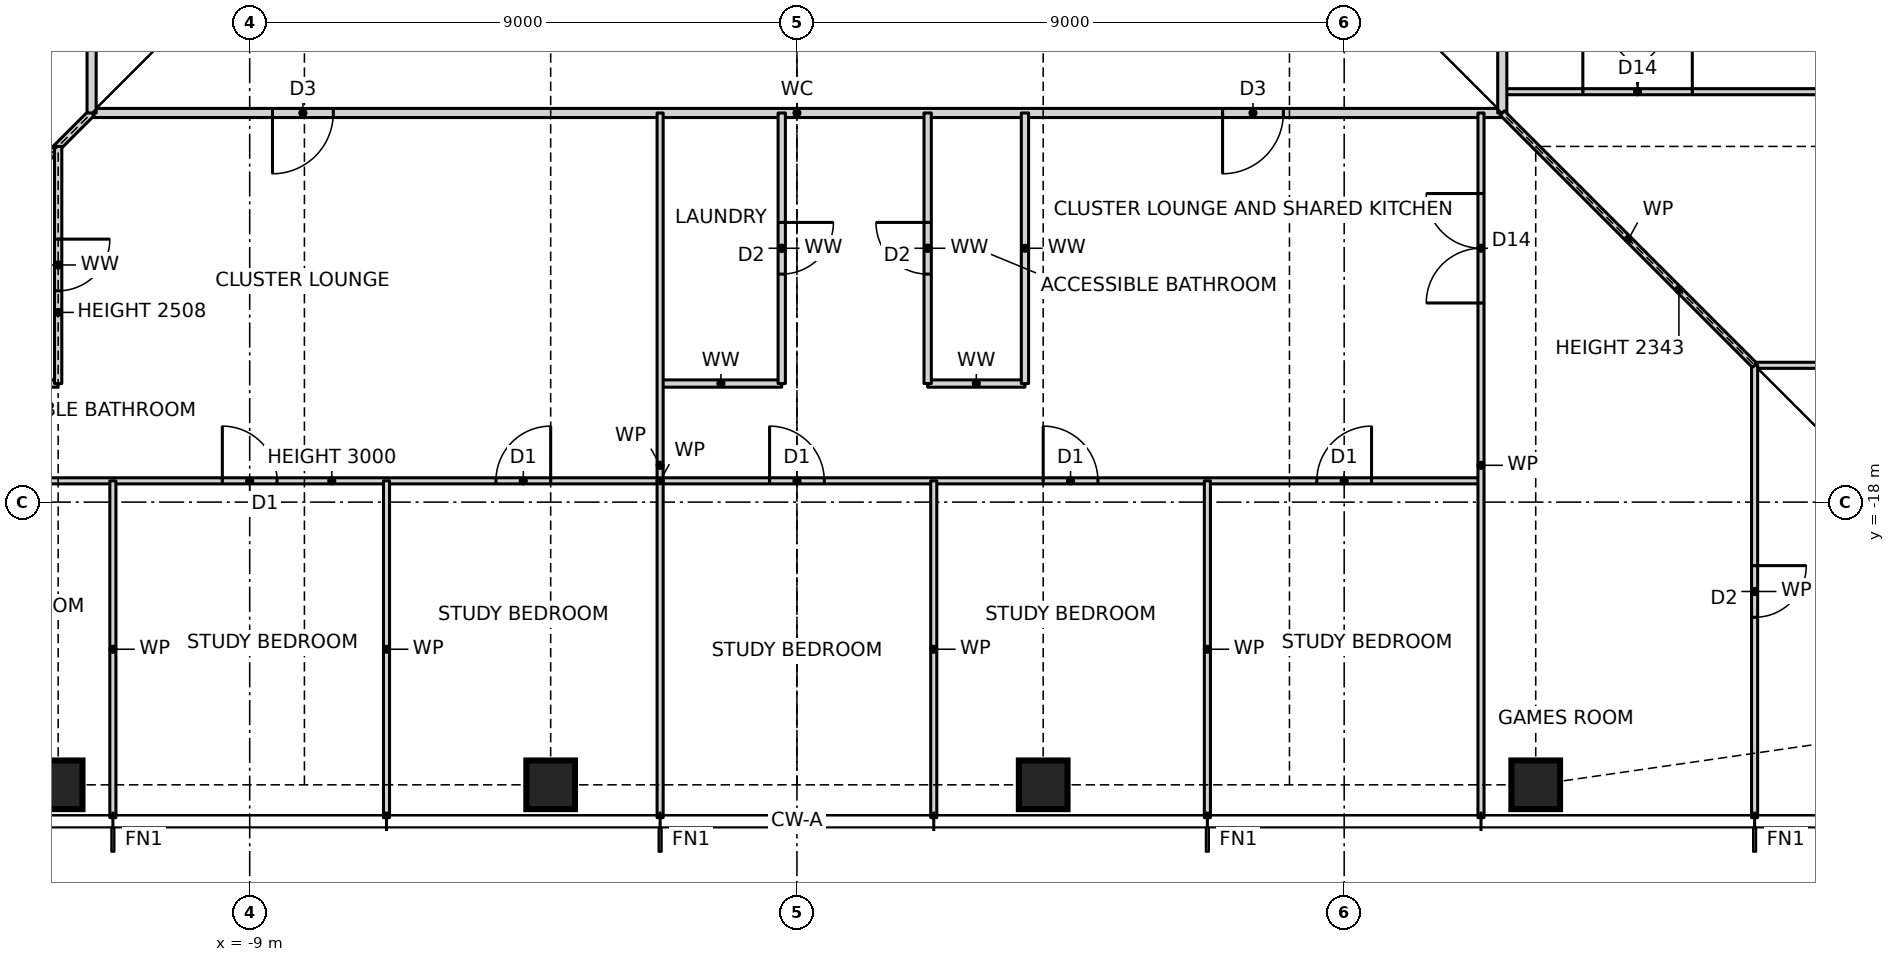
"""IFC4 building model, lengths in metres.
Left out: names, types, materials, properties, quantities, classifications, styles, units other than length and angle.
Written with IfcOpenShell. Run it as: python <this file> out.ifc"""

import sys

from ifc_helpers import new_model, si_unit, direction, frame, frame_2d, origin, origin_2d, place, context, subcontext, project, spatial, rectangle, hollow_rectangle, extrude, element, fill, save


model = new_model("IFC4")
c1 = context("Model", 3, precision=1e-05, world=origin(), true_north=direction((0.0, 1.0)))
c2 = subcontext(c1, "Body", "Model", "MODEL_VIEW")
j1 = project(units=[si_unit("LENGTHUNIT", "METRE"), si_unit("PLANEANGLEUNIT", "RADIAN")], contexts=[c1])
p1 = place(None, origin())
s1 = spatial("IfcSite", under=j1, at=p1, CompositionType="ELEMENT")
p2 = place(p1, origin())
s2 = spatial("IfcBuilding", under=s1, at=p2, CompositionType="ELEMENT")
p3 = place(p2, frame((0.0, 0.0, 39.5)))
s3 = spatial("IfcBuildingStorey", under=s2, at=p3, CompositionType="ELEMENT", Elevation=39.5)
for number, where, z_axis, x_axis in (
    (1, (-12.15, -22.65, 0.0), (0.0, 0.0, 1.0), (1.0, 0.0, 0.0)),
    (2, (-4.05, -22.65, 0.0), (0.0, 0.0, 1.0), (1.0, 0.0, 0.0)),
    (3, (4.05, -22.65, 0.0), (0.0, 0.0, 1.0), (1.0, 0.0, 0.0)),
    (4, (12.15, -22.65, 0.0), (0.0, 0.0, 1.0), (1.0, 0.0, 0.0)),
):
    element("IfcColumn", number, at=place(p3, frame(where, z_axis=z_axis, x_axis=x_axis)), inside=s3, PredefinedType="COLUMN", context=c2, shape_type="SweptSolid", body=[
        extrude(hollow_rectangle(XDim=0.8, YDim=0.8, WallThickness=0.09, at=origin_2d()), origin(), (0.0, 0.0, 1.0), 3.5),
    ])
p4 = place(p3, frame((-15.75, -17.65, 0.0), z_axis=(0.0, 0.0, 1.0), x_axis=(1.0, 0.0, 0.0)))
e5 = element("IfcWall", 5, at=p4, inside=s3, PredefinedType="PARTITIONING", context=c2, shape_type="SweptSolid", body=[
    extrude(rectangle(XDim=27.0, YDim=0.1, at=frame_2d((13.5, 0.0))), origin(), (0.0, 0.0, 1.0), 3.0),
])
p5 = place(p4, frame((1.8, 0.0, 0.0)))
e6 = element("IfcOpeningElement", 6, at=p5, cuts=e5, PredefinedType="OPENING", context=c2, shape_type="SweptSolid", body=[
    extrude(rectangle(XDim=0.9, YDim=2.1, at=frame_2d((0.45, 1.05))), frame((0.0, 0.06, 0.0), z_axis=(0.0, -1.0, 0.0), x_axis=(1.0, 0.0, 0.0)), (0.0, 0.0, 1.0), 0.12),
])
p6 = place(p4, frame((6.3, 0.0, 0.0)))
e7 = element("IfcOpeningElement", 7, at=p6, cuts=e5, PredefinedType="OPENING", context=c2, shape_type="SweptSolid", body=[
    extrude(rectangle(XDim=0.9, YDim=2.1, at=frame_2d((0.45, 1.05))), frame((0.0, 0.06, 0.0), z_axis=(0.0, -1.0, 0.0), x_axis=(1.0, 0.0, 0.0)), (0.0, 0.0, 1.0), 0.12),
])
p7 = place(p4, frame((10.8, 0.0, 0.0)))
e8 = element("IfcOpeningElement", 8, at=p7, cuts=e5, PredefinedType="OPENING", context=c2, shape_type="SweptSolid", body=[
    extrude(rectangle(XDim=0.9, YDim=2.1, at=frame_2d((0.45, 1.05))), frame((0.0, 0.06, 0.0), z_axis=(0.0, -1.0, 0.0), x_axis=(1.0, 0.0, 0.0)), (0.0, 0.0, 1.0), 0.12),
])
p8 = place(p4, frame((15.3, 0.0, 0.0)))
e9 = element("IfcOpeningElement", 9, at=p8, cuts=e5, PredefinedType="OPENING", context=c2, shape_type="SweptSolid", body=[
    extrude(rectangle(XDim=0.9, YDim=2.1, at=frame_2d((0.45, 1.05))), frame((0.0, 0.06, 0.0), z_axis=(0.0, -1.0, 0.0), x_axis=(1.0, 0.0, 0.0)), (0.0, 0.0, 1.0), 0.12),
])
p9 = place(p4, frame((19.8, 0.0, 0.0)))
e10 = element("IfcOpeningElement", 10, at=p9, cuts=e5, PredefinedType="OPENING", context=c2, shape_type="SweptSolid", body=[
    extrude(rectangle(XDim=0.9, YDim=2.1, at=frame_2d((0.45, 1.05))), frame((0.0, 0.06, 0.0), z_axis=(0.0, -1.0, 0.0), x_axis=(1.0, 0.0, 0.0)), (0.0, 0.0, 1.0), 0.12),
])
p10 = place(p4, frame((24.3, 0.0, 0.0)))
e11 = element("IfcOpeningElement", 11, at=p10, cuts=e5, PredefinedType="OPENING", context=c2, shape_type="SweptSolid", body=[
    extrude(rectangle(XDim=0.9, YDim=2.1, at=frame_2d((0.45, 1.05))), frame((0.0, 0.06, 0.0), z_axis=(0.0, -1.0, 0.0), x_axis=(1.0, 0.0, 0.0)), (0.0, 0.0, 1.0), 0.12),
])
p11 = place(p3, frame((-15.75, -16.05, 0.0), z_axis=(0.0, 0.0, 1.0), x_axis=(1.0, 0.0, 0.0)))
e12 = element("IfcWall", 12, at=p11, inside=s3, PredefinedType="PARTITIONING", context=c2, shape_type="SweptSolid", body=[
    extrude(rectangle(XDim=3.6, YDim=0.12, at=frame_2d((1.8, 0.0))), origin(), (0.0, 0.0, 1.0), 3.27),
])
p12 = place(p3, frame((-2.25, -16.05, 0.0), z_axis=(0.0, 0.0, 1.0), x_axis=(1.0, 0.0, 0.0)))
e13 = element("IfcWall", 13, at=p12, inside=s3, PredefinedType="PARTITIONING", context=c2, shape_type="SweptSolid", body=[
    extrude(rectangle(XDim=2.0, YDim=0.12, at=frame_2d((1.0, 0.0))), origin(), (0.0, 0.0, 1.0), 3.27),
])
p13 = place(p3, frame((2.15, -16.05, 0.0), z_axis=(0.0, 0.0, 1.0), x_axis=(1.0, 0.0, 0.0)))
e14 = element("IfcWall", 14, at=p13, inside=s3, PredefinedType="PARTITIONING", context=c2, shape_type="SweptSolid", body=[
    extrude(rectangle(XDim=1.6, YDim=0.12, at=frame_2d((0.8, 0.0))), origin(), (0.0, 0.0, 1.0), 3.27),
])
p14 = place(p3, frame((15.75, -15.75, 0.0), z_axis=(0.0, 0.0, 1.0), x_axis=(1.0, 0.0, 0.0)))
e15 = element("IfcWall", 15, at=p14, inside=s3, PredefinedType="PARTITIONING", context=c2, shape_type="SweptSolid", body=[
    extrude(rectangle(XDim=7.44, YDim=0.1, at=frame_2d((3.72, 0.0))), origin(), (0.0, 0.0, 1.0), 3.27),
])
p15 = place(p3, frame((-11.6, -11.6, 0.0), z_axis=(0.0, 0.0, 1.0), x_axis=(1.0, 0.0, 0.0)))
e16 = element("IfcWall", 16, at=p15, inside=s3, PredefinedType="PARTITIONING", context=c2, shape_type="SweptSolid", body=[
    extrude(rectangle(XDim=23.2, YDim=0.15, at=frame_2d((11.6, 0.0))), origin(), (0.0, 0.0, 1.0), 3.27),
])
p16 = place(p15, frame((2.975, 0.0, 0.0)))
e17 = element("IfcOpeningElement", 17, at=p16, cuts=e16, PredefinedType="OPENING", context=c2, shape_type="SweptSolid", body=[
    extrude(rectangle(XDim=1.0, YDim=2.1, at=frame_2d((0.5, 1.05))), frame((0.0, 0.085, 0.0), z_axis=(0.0, -1.0, 0.0), x_axis=(1.0, 0.0, 0.0)), (0.0, 0.0, 1.0), 0.17),
])
p17 = place(p15, frame((18.6, 0.0, 0.0)))
e18 = element("IfcOpeningElement", 18, at=p17, cuts=e16, PredefinedType="OPENING", context=c2, shape_type="SweptSolid", body=[
    extrude(rectangle(XDim=1.0, YDim=2.1, at=frame_2d((0.5, 1.05))), frame((0.0, 0.085, 0.0), z_axis=(0.0, -1.0, 0.0), x_axis=(1.0, 0.0, 0.0)), (0.0, 0.0, 1.0), 0.17),
])
p18 = place(p3, frame((11.6, -11.25, 0.0), z_axis=(0.0, 0.0, 1.0), x_axis=(1.0, 0.0, 0.0)))
e19 = element("IfcWall", 19, at=p18, inside=s3, PredefinedType="PARTITIONING", context=c2, shape_type="SweptSolid", body=[
    extrude(rectangle(XDim=11.59, YDim=0.1, at=frame_2d((5.795, 0.0))), origin(), (0.0, 0.0, 1.0), 3.27),
])
p19 = place(p18, frame((1.325, 0.0, 0.0)))
e20 = element("IfcOpeningElement", 20, at=p19, cuts=e19, PredefinedType="OPENING", context=c2, shape_type="SweptSolid", body=[
    extrude(rectangle(XDim=1.8, YDim=2.1, at=frame_2d((0.9, 1.05))), frame((0.0, 0.06, 0.0), z_axis=(0.0, -1.0, 0.0), x_axis=(1.0, 0.0, 0.0)), (0.0, 0.0, 1.0), 0.12),
])
p20 = place(p3, frame((-15.75, -15.75, 0.0), z_axis=(0.0, 0.0, 1.0), x_axis=(0.707106781187, 0.707106781187, 0.0)))
e21 = element("IfcWall", 21, at=p20, inside=s3, PredefinedType="PARTITIONING", context=c2, shape_type="SweptSolid", body=[
    extrude(rectangle(XDim=5.869, YDim=0.12, at=frame_2d((2.935, 0.0))), origin(), (0.0, 0.0, 1.0), 2.343),
])
p21 = place(p3, frame((15.75, -23.19, 0.0), z_axis=(0.0, 0.0, 1.0), x_axis=(0.0, 1.0, 0.0)))
e22 = element("IfcWall", 22, at=p21, inside=s3, PredefinedType="PARTITIONING", context=c2, shape_type="SweptSolid", body=[
    extrude(rectangle(XDim=7.44, YDim=0.1, at=frame_2d((3.72, 0.0))), origin(), (0.0, 0.0, 1.0), 3.27),
])
p22 = place(p21, frame((3.295, 0.0, 0.0)))
e23 = element("IfcOpeningElement", 23, at=p22, cuts=e22, PredefinedType="OPENING", context=c2, shape_type="SweptSolid", body=[
    extrude(rectangle(XDim=0.85, YDim=2.1, at=frame_2d((0.425, 1.05))), frame((0.0, 0.06, 0.0), z_axis=(0.0, -1.0, 0.0), x_axis=(1.0, 0.0, 0.0)), (0.0, 0.0, 1.0), 0.12),
])
p23 = place(p3, frame((11.6, -11.6, 0.0), z_axis=(0.0, 0.0, 1.0), x_axis=(0.0, 1.0, 0.0)))
e24 = element("IfcWall", 24, at=p23, inside=s3, PredefinedType="PARTITIONING", context=c2, shape_type="SweptSolid", body=[
    extrude(rectangle(XDim=24.2, YDim=0.15, at=frame_2d((12.1, 0.0))), origin(), (0.0, 0.0, 1.0), 3.27),
])
p24 = place(p23, frame((3.6, 0.0, 0.0)))
e25 = element("IfcOpeningElement", 25, at=p24, cuts=e24, PredefinedType="OPENING", context=c2, shape_type="SweptSolid", body=[
    extrude(rectangle(XDim=1.0, YDim=2.1, at=frame_2d((0.5, 1.05))), frame((0.0, 0.085, 0.0), z_axis=(0.0, -1.0, 0.0), x_axis=(1.0, 0.0, 0.0)), (0.0, 0.0, 1.0), 0.17),
])
p25 = place(p23, frame((21.025, 0.0, 0.0)))
e26 = element("IfcOpeningElement", 26, at=p25, cuts=e24, PredefinedType="OPENING", context=c2, shape_type="SweptSolid", body=[
    extrude(rectangle(XDim=1.0, YDim=2.1, at=frame_2d((0.5, 1.05))), frame((0.0, 0.085, 0.0), z_axis=(0.0, -1.0, 0.0), x_axis=(1.0, 0.0, 0.0)), (0.0, 0.0, 1.0), 0.17),
])
p26 = place(p3, frame((11.25, -23.19, 0.0), z_axis=(0.0, 0.0, 1.0), x_axis=(0.0, 1.0, 0.0)))
e27 = element("IfcWall", 27, at=p26, inside=s3, PredefinedType="PARTITIONING", context=c2, shape_type="SweptSolid", body=[
    extrude(rectangle(XDim=11.59, YDim=0.1, at=frame_2d((5.795, 0.0))), origin(), (0.0, 0.0, 1.0), 3.27),
])
p27 = place(p26, frame((8.465, 0.0, 0.0)))
e28 = element("IfcOpeningElement", 28, at=p27, cuts=e27, PredefinedType="OPENING", context=c2, shape_type="SweptSolid", body=[
    extrude(rectangle(XDim=1.8, YDim=2.1, at=frame_2d((0.9, 1.05))), frame((0.0, 0.06, 0.0), z_axis=(0.0, -1.0, 0.0), x_axis=(1.0, 0.0, 0.0)), (0.0, 0.0, 1.0), 0.12),
])
p28 = place(p3, frame((6.75, -23.19, 0.0), z_axis=(0.0, 0.0, 1.0), x_axis=(0.0, 1.0, 0.0)))
e29 = element("IfcWall", 29, at=p28, inside=s3, PredefinedType="PARTITIONING", context=c2, shape_type="SweptSolid", body=[
    extrude(rectangle(XDim=5.54, YDim=0.1, at=frame_2d((2.77, 0.0))), origin(), (0.0, 0.0, 1.0), 3.27),
])
p29 = place(p3, frame((3.75, -16.05, 0.0), z_axis=(0.0, 0.0, 1.0), x_axis=(0.0, 1.0, 0.0)))
e30 = element("IfcWall", 30, at=p29, inside=s3, PredefinedType="PARTITIONING", context=c2, shape_type="SweptSolid", body=[
    extrude(rectangle(XDim=4.45, YDim=0.12, at=frame_2d((2.225, 0.0))), origin(), (0.0, 0.0, 1.0), 3.27),
])
p30 = place(p3, frame((2.25, -23.19, 0.0), z_axis=(0.0, 0.0, 1.0), x_axis=(0.0, 1.0, 0.0)))
e31 = element("IfcWall", 31, at=p30, inside=s3, PredefinedType="PARTITIONING", context=c2, shape_type="SweptSolid", body=[
    extrude(rectangle(XDim=5.54, YDim=0.1, at=frame_2d((2.77, 0.0))), origin(), (0.0, 0.0, 1.0), 3.27),
])
p31 = place(p3, frame((2.15, -16.05, 0.0), z_axis=(0.0, 0.0, 1.0), x_axis=(0.0, 1.0, 0.0)))
e32 = element("IfcWall", 32, at=p31, inside=s3, PredefinedType="PARTITIONING", context=c2, shape_type="SweptSolid", body=[
    extrude(rectangle(XDim=4.45, YDim=0.12, at=frame_2d((2.225, 0.0))), origin(), (0.0, 0.0, 1.0), 3.27),
])
p32 = place(p31, frame((1.8, 0.0, 0.0)))
e33 = element("IfcOpeningElement", 33, at=p32, cuts=e32, PredefinedType="OPENING", context=c2, shape_type="SweptSolid", body=[
    extrude(rectangle(XDim=0.85, YDim=2.1, at=frame_2d((0.425, 1.05))), frame((0.0, 0.07, 0.0), z_axis=(0.0, -1.0, 0.0), x_axis=(1.0, 0.0, 0.0)), (0.0, 0.0, 1.0), 0.14),
])
p33 = place(p3, frame((-0.25, -16.05, 0.0), z_axis=(0.0, 0.0, 1.0), x_axis=(0.0, 1.0, 0.0)))
e34 = element("IfcWall", 34, at=p33, inside=s3, PredefinedType="PARTITIONING", context=c2, shape_type="SweptSolid", body=[
    extrude(rectangle(XDim=4.45, YDim=0.12, at=frame_2d((2.225, 0.0))), origin(), (0.0, 0.0, 1.0), 3.27),
])
p34 = place(p33, frame((1.8, 0.0, 0.0)))
e35 = element("IfcOpeningElement", 35, at=p34, cuts=e34, PredefinedType="OPENING", context=c2, shape_type="SweptSolid", body=[
    extrude(rectangle(XDim=0.85, YDim=2.1, at=frame_2d((0.425, 1.05))), frame((0.0, 0.07, 0.0), z_axis=(0.0, -1.0, 0.0), x_axis=(1.0, 0.0, 0.0)), (0.0, 0.0, 1.0), 0.14),
])
p35 = place(p3, frame((-2.25, -23.19, 0.0), z_axis=(0.0, 0.0, 1.0), x_axis=(0.0, 1.0, 0.0)))
e36 = element("IfcWall", 36, at=p35, inside=s3, PredefinedType="PARTITIONING", context=c2, shape_type="SweptSolid", body=[
    extrude(rectangle(XDim=11.59, YDim=0.1, at=frame_2d((5.795, 0.0))), origin(), (0.0, 0.0, 1.0), 3.27),
])
for number, where, z_axis, x_axis in (
    (37, (-6.75, -23.19, 0.0), (0.0, 0.0, 1.0), (0.0, 1.0, 0.0)),
    (38, (-11.25, -23.19, 0.0), (0.0, 0.0, 1.0), (0.0, 1.0, 0.0)),
):
    element("IfcWall", number, at=place(p3, frame(where, z_axis=z_axis, x_axis=x_axis)), inside=s3, PredefinedType="PARTITIONING", context=c2, shape_type="SweptSolid", body=[
        extrude(rectangle(XDim=5.54, YDim=0.1, at=frame_2d((2.77, 0.0))), origin(), (0.0, 0.0, 1.0), 3.27),
    ])
p36 = place(p3, frame((-11.6, -11.6, 0.0), z_axis=(0.0, 0.0, 1.0), x_axis=(0.0, 1.0, 0.0)))
e39 = element("IfcWall", 39, at=p36, inside=s3, PredefinedType="PARTITIONING", context=c2, shape_type="SweptSolid", body=[
    extrude(rectangle(XDim=24.2, YDim=0.15, at=frame_2d((12.1, 0.0))), origin(), (0.0, 0.0, 1.0), 3.27),
])
p37 = place(p36, frame((12.14, 0.0, 0.0)))
e40 = element("IfcOpeningElement", 40, at=p37, cuts=e39, PredefinedType="OPENING", context=c2, shape_type="SweptSolid", body=[
    extrude(rectangle(XDim=1.0, YDim=2.1, at=frame_2d((0.5, 1.05))), frame((0.0, 0.085, 0.0), z_axis=(0.0, -1.0, 0.0), x_axis=(1.0, 0.0, 0.0)), (0.0, 0.0, 1.0), 0.17),
])
p38 = place(p3, frame((-12.15, -16.05, 0.0), z_axis=(0.0, 0.0, 1.0), x_axis=(0.0, 1.0, 0.0)))
e41 = element("IfcWall", 41, at=p38, inside=s3, PredefinedType="PARTITIONING", context=c2, shape_type="SweptSolid", body=[
    extrude(rectangle(XDim=3.9, YDim=0.12, at=frame_2d((1.95, 0.0))), origin(), (0.0, 0.0, 1.0), 2.508),
])
p39 = place(p38, frame((1.525, 0.0, 0.0)))
e42 = element("IfcOpeningElement", 42, at=p39, cuts=e41, PredefinedType="OPENING", context=c2, shape_type="SweptSolid", body=[
    extrude(rectangle(XDim=0.85, YDim=2.1, at=frame_2d((0.425, 1.05))), frame((0.0, 0.07, 0.0), z_axis=(0.0, -1.0, 0.0), x_axis=(1.0, 0.0, 0.0)), (0.0, 0.0, 1.0), 0.14),
])
p40 = place(p3, frame((15.75, -15.75, 0.0), z_axis=(0.0, 0.0, 1.0), x_axis=(-0.707106781187, 0.707106781187, 0.0)))
e43 = element("IfcWall", 43, at=p40, inside=s3, PredefinedType="PARTITIONING", context=c2, shape_type="SweptSolid", body=[
    extrude(rectangle(XDim=5.869, YDim=0.1, at=frame_2d((2.935, 0.0))), origin(), (0.0, 0.0, 1.0), 2.343),
])
p41 = place(p6, origin())
e44 = element("IfcDoor", 44, at=p41, inside=s3, OperationType="SINGLE_SWING_LEFT", PredefinedType="DOOR", context=c2, shape_type="SweptSolid", body=[
    extrude(rectangle(XDim=0.9, YDim=2.1, at=frame_2d((0.45, 1.05))), frame((0.0, 0.025, 0.0), z_axis=(0.0, -1.0, 0.0), x_axis=(1.0, 0.0, 0.0)), (0.0, 0.0, 1.0), 0.05),
])
fill(e7, e44)
p42 = place(p7, origin())
e45 = element("IfcDoor", 45, at=p42, inside=s3, OperationType="SINGLE_SWING_RIGHT", PredefinedType="DOOR", context=c2, shape_type="SweptSolid", body=[
    extrude(rectangle(XDim=0.9, YDim=2.1, at=frame_2d((0.45, 1.05))), frame((0.0, 0.025, 0.0), z_axis=(0.0, -1.0, 0.0), x_axis=(1.0, 0.0, 0.0)), (0.0, 0.0, 1.0), 0.05),
])
fill(e8, e45)
p43 = place(p16, frame((1.0, 0.0, 0.0), z_axis=(0.0, 0.0, 1.0), x_axis=(-1.0, 0.0, 0.0)))
e46 = element("IfcDoor", 46, at=p43, inside=s3, OperationType="SINGLE_SWING_RIGHT", PredefinedType="DOOR", context=c2, shape_type="SweptSolid", body=[
    extrude(rectangle(XDim=1.0, YDim=2.1, at=frame_2d((0.5, 1.05))), frame((0.0, 0.025, 0.0), z_axis=(0.0, -1.0, 0.0), x_axis=(1.0, 0.0, 0.0)), (0.0, 0.0, 1.0), 0.05),
])
fill(e17, e46)
p44 = place(p39, frame((0.85, 0.0, 0.0), z_axis=(0.0, 0.0, 1.0), x_axis=(-1.0, 0.0, 0.0)))
e47 = element("IfcDoor", 47, at=p44, inside=s3, OperationType="SINGLE_SWING_LEFT", PredefinedType="DOOR", context=c2, shape_type="SweptSolid", body=[
    extrude(rectangle(XDim=0.85, YDim=2.1, at=frame_2d((0.425, 1.05))), frame((0.0, 0.025, 0.0), z_axis=(0.0, -1.0, 0.0), x_axis=(1.0, 0.0, 0.0)), (0.0, 0.0, 1.0), 0.05),
])
fill(e42, e47)
p45 = place(p8, origin())
e48 = element("IfcDoor", 48, at=p45, inside=s3, OperationType="SINGLE_SWING_LEFT", PredefinedType="DOOR", context=c2, shape_type="SweptSolid", body=[
    extrude(rectangle(XDim=0.9, YDim=2.1, at=frame_2d((0.45, 1.05))), frame((0.0, 0.025, 0.0), z_axis=(0.0, -1.0, 0.0), x_axis=(1.0, 0.0, 0.0)), (0.0, 0.0, 1.0), 0.05),
])
fill(e9, e48)
p46 = place(p9, origin())
e49 = element("IfcDoor", 49, at=p46, inside=s3, OperationType="SINGLE_SWING_LEFT", PredefinedType="DOOR", context=c2, shape_type="SweptSolid", body=[
    extrude(rectangle(XDim=0.9, YDim=2.1, at=frame_2d((0.45, 1.05))), frame((0.0, 0.025, 0.0), z_axis=(0.0, -1.0, 0.0), x_axis=(1.0, 0.0, 0.0)), (0.0, 0.0, 1.0), 0.05),
])
fill(e10, e49)
p47 = place(p10, origin())
e50 = element("IfcDoor", 50, at=p47, inside=s3, OperationType="SINGLE_SWING_RIGHT", PredefinedType="DOOR", context=c2, shape_type="SweptSolid", body=[
    extrude(rectangle(XDim=0.9, YDim=2.1, at=frame_2d((0.45, 1.05))), frame((0.0, 0.025, 0.0), z_axis=(0.0, -1.0, 0.0), x_axis=(1.0, 0.0, 0.0)), (0.0, 0.0, 1.0), 0.05),
])
fill(e11, e50)
p48 = place(p17, frame((1.0, 0.0, 0.0), z_axis=(0.0, 0.0, 1.0), x_axis=(-1.0, 0.0, 0.0)))
e51 = element("IfcDoor", 51, at=p48, inside=s3, OperationType="SINGLE_SWING_RIGHT", PredefinedType="DOOR", context=c2, shape_type="SweptSolid", body=[
    extrude(rectangle(XDim=1.0, YDim=2.1, at=frame_2d((0.5, 1.05))), frame((0.0, 0.025, 0.0), z_axis=(0.0, -1.0, 0.0), x_axis=(1.0, 0.0, 0.0)), (0.0, 0.0, 1.0), 0.05),
])
fill(e18, e51)
p49 = place(p34, frame((0.85, 0.0, 0.0), z_axis=(0.0, 0.0, 1.0), x_axis=(-1.0, 0.0, 0.0)))
e52 = element("IfcDoor", 52, at=p49, inside=s3, OperationType="SINGLE_SWING_LEFT", PredefinedType="DOOR", context=c2, shape_type="SweptSolid", body=[
    extrude(rectangle(XDim=0.85, YDim=2.1, at=frame_2d((0.425, 1.05))), frame((0.0, 0.025, 0.0), z_axis=(0.0, -1.0, 0.0), x_axis=(1.0, 0.0, 0.0)), (0.0, 0.0, 1.0), 0.05),
])
fill(e35, e52)
p50 = place(p32, origin())
e53 = element("IfcDoor", 53, at=p50, inside=s3, OperationType="SINGLE_SWING_RIGHT", PredefinedType="DOOR", context=c2, shape_type="SweptSolid", body=[
    extrude(rectangle(XDim=0.85, YDim=2.1, at=frame_2d((0.425, 1.05))), frame((0.0, 0.025, 0.0), z_axis=(0.0, -1.0, 0.0), x_axis=(1.0, 0.0, 0.0)), (0.0, 0.0, 1.0), 0.05),
])
fill(e33, e53)
p51 = place(p27, origin())
e54 = element("IfcDoor", 54, at=p51, inside=s3, OperationType="DOUBLE_DOOR_SINGLE_SWING", PredefinedType="DOOR", context=c2, shape_type="SweptSolid", body=[
    extrude(rectangle(XDim=1.8, YDim=2.1, at=frame_2d((0.9, 1.05))), frame((0.0, 0.025, 0.0), z_axis=(0.0, -1.0, 0.0), x_axis=(1.0, 0.0, 0.0)), (0.0, 0.0, 1.0), 0.05),
])
fill(e28, e54)
p52 = place(p19, origin())
e55 = element("IfcDoor", 55, at=p52, inside=s3, OperationType="DOUBLE_DOOR_SINGLE_SWING", PredefinedType="DOOR", context=c2, shape_type="SweptSolid", body=[
    extrude(rectangle(XDim=1.8, YDim=2.1, at=frame_2d((0.9, 1.05))), frame((0.0, 0.025, 0.0), z_axis=(0.0, -1.0, 0.0), x_axis=(1.0, 0.0, 0.0)), (0.0, 0.0, 1.0), 0.05),
])
fill(e20, e55)
p53 = place(p22, frame((0.85, 0.0, 0.0), z_axis=(0.0, 0.0, 1.0), x_axis=(-1.0, 0.0, 0.0)))
e56 = element("IfcDoor", 56, at=p53, inside=s3, OperationType="SINGLE_SWING_LEFT", PredefinedType="DOOR", context=c2, shape_type="SweptSolid", body=[
    extrude(rectangle(XDim=0.85, YDim=2.1, at=frame_2d((0.425, 1.05))), frame((0.0, 0.025, 0.0), z_axis=(0.0, -1.0, 0.0), x_axis=(1.0, 0.0, 0.0)), (0.0, 0.0, 1.0), 0.05),
])
fill(e23, e56)
save(model, sys.argv[1])
